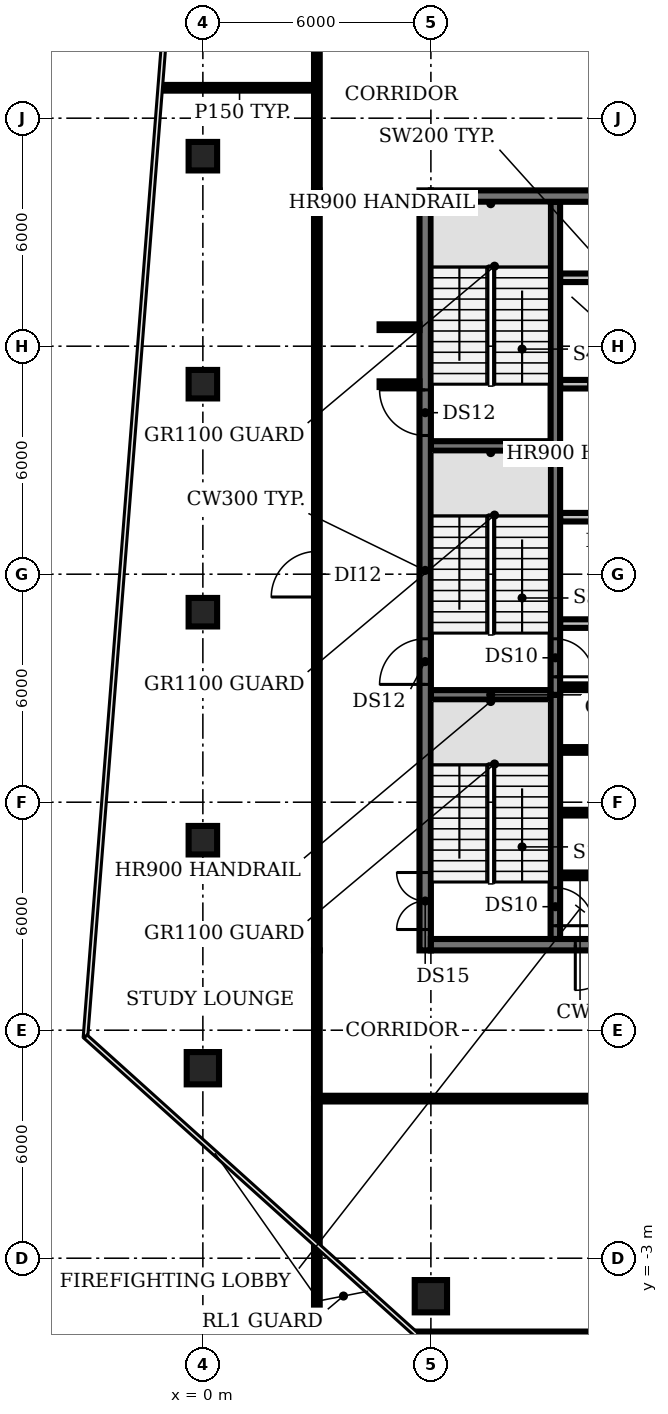
"""IFC4 building model, lengths in metres.
Left out: names, types, materials, properties, quantities, classifications, styles, units other than length and angle.
Written with IfcOpenShell. Run it as: python <this file> out.ifc"""

import sys

from ifc_helpers import new_model, si_unit, direction, frame, frame_2d, origin, origin_2d, place, context, subcontext, project, spatial, rectangle, circle, extrude, element, fill, save


model = new_model("IFC4")
c1 = context("Model", 3, precision=1e-05, world=origin(), true_north=direction((0.0, 1.0)))
c2 = subcontext(c1, "Body", "Model", "MODEL_VIEW")
j1 = project(units=[si_unit("LENGTHUNIT", "METRE"), si_unit("PLANEANGLEUNIT", "RADIAN")], contexts=[c1])
p1 = place(None, origin())
s1 = spatial("IfcSite", under=j1, at=p1, CompositionType="ELEMENT")
p2 = place(p1, origin())
s2 = spatial("IfcBuilding", under=s1, at=p2, CompositionType="ELEMENT")
p3 = place(p2, frame((0.0, 0.0, 268.4)))
s3 = spatial("IfcBuildingStorey", under=s2, at=p3, CompositionType="ELEMENT", Elevation=268.4)
p4 = place(p3, frame((0.0, 2.0, 0.0), z_axis=(0.0, 0.0, 1.0), x_axis=(1.0, 0.0, 0.0)))
e1 = element("IfcColumn", 1, at=p4, inside=s3, PredefinedType="COLUMN", context=c2, shape_type="SweptSolid", body=[
    extrude(circle(Radius=0.425, at=origin_2d()), origin(), (0.0, 0.0, 1.0), 3.8),
])
for number, where, z_axis, x_axis in (
    (2, (0.0, 8.0, 0.0), (0.0, 0.0, 1.0), (1.0, 0.0, 0.0)),
    (3, (0.0, 14.0, 0.0), (0.0, 0.0, 1.0), (1.0, 0.0, 0.0)),
    (4, (0.0, 20.0, 0.0), (0.0, 0.0, 1.0), (1.0, 0.0, 0.0)),
    (5, (0.0, 26.0, 0.0), (0.0, 0.0, 1.0), (1.0, 0.0, 0.0)),
):
    element("IfcColumn", number, at=place(p3, frame(where, z_axis=z_axis, x_axis=x_axis)), inside=s3, PredefinedType="COLUMN", context=c2, shape_type="SweptSolid", body=[
        extrude(rectangle(XDim=0.75, YDim=0.75, at=origin_2d()), origin(), (0.0, 0.0, 1.0), 3.8),
    ])
p5 = place(p3, frame((6.0, -4.0, 0.0), z_axis=(0.0, 0.0, 1.0), x_axis=(1.0, 0.0, 0.0)))
e6 = element("IfcColumn", 6, at=p5, inside=s3, PredefinedType="COLUMN", context=c2, shape_type="SweptSolid", body=[
    extrude(circle(Radius=0.425, at=origin_2d()), origin(), (0.0, 0.0, 1.0), 3.8),
])
p6 = place(p3, frame((5.64, -5.08, 0.0), z_axis=(0.0, 0.0, 1.0), x_axis=(1.0, 0.0, 0.0)))
e7 = element("IfcWall", 7, at=p6, inside=s3, PredefinedType="SOLIDWALL", context=c2, shape_type="SweptSolid", body=[
    extrude(rectangle(XDim=8.493, YDim=0.3, at=frame_2d((4.247, 0.0))), origin(), (0.0, 0.0, 1.0), 3.8),
])
for number, where, z_axis, x_axis in (
    (8, (9.4, 7.075, 0.0), (0.0, 0.0, 1.0), (1.0, 0.0, 0.0)),
    (9, (9.4, 8.725, 0.0), (0.0, 0.0, 1.0), (1.0, 0.0, 0.0)),
    (10, (9.4, 10.375, 0.0), (0.0, 0.0, 1.0), (1.0, 0.0, 0.0)),
):
    element("IfcWall", number, at=place(p3, frame(where, z_axis=z_axis, x_axis=x_axis)), inside=s3, PredefinedType="SHEAR", context=c2, shape_type="SweptSolid", body=[
        extrude(rectangle(XDim=1.05, YDim=0.15, at=frame_2d((0.525, 0.0))), origin(), (0.0, 0.0, 1.0), 3.8),
    ])
p7 = place(p3, frame((6.0, 11.825, 0.0), z_axis=(0.0, 0.0, 1.0), x_axis=(1.0, 0.0, 0.0)))
e11 = element("IfcWall", 11, at=p7, inside=s3, PredefinedType="SHEAR", context=c2, shape_type="SweptSolid", body=[
    extrude(rectangle(XDim=3.15, YDim=0.25, at=frame_2d((1.575, 0.0))), origin(), (0.0, 0.0, 1.0), 3.8),
])
p8 = place(p3, frame((9.4, 12.025, 0.0), z_axis=(0.0, 0.0, 1.0), x_axis=(1.0, 0.0, 0.0)))
e12 = element("IfcWall", 12, at=p8, inside=s3, PredefinedType="SHEAR", context=c2, shape_type="SweptSolid", body=[
    extrude(rectangle(XDim=1.05, YDim=0.15, at=frame_2d((0.525, 0.0))), origin(), (0.0, 0.0, 1.0), 3.8),
])
p9 = place(p3, frame((9.4, 13.7, 0.0), z_axis=(0.0, 0.0, 1.0), x_axis=(1.0, 0.0, 0.0)))
e13 = element("IfcWall", 13, at=p9, inside=s3, PredefinedType="PARTITIONING", context=c2, shape_type="SweptSolid", body=[
    extrude(rectangle(XDim=4.0, YDim=0.225, at=frame_2d((2.0, 0.0))), origin(), (0.0, 0.0, 1.0), 3.8),
])
p10 = place(p3, frame((9.4, 16.5, 0.0), z_axis=(0.0, 0.0, 1.0), x_axis=(1.0, 0.0, 0.0)))
e14 = element("IfcWall", 14, at=p10, inside=s3, PredefinedType="PARTITIONING", context=c2, shape_type="SweptSolid", body=[
    extrude(rectangle(XDim=14.6, YDim=0.225, at=frame_2d((7.3, 0.0))), origin(), (0.0, 0.0, 1.0), 3.8),
])
p11 = place(p10, frame((0.85, 0.0, 0.0)))
e15 = element("IfcOpeningElement", 15, at=p11, cuts=e14, PredefinedType="OPENING", context=c2, shape_type="SweptSolid", body=[
    extrude(rectangle(XDim=0.9, YDim=2.1, at=frame_2d((0.45, 1.05))), frame((0.0, 0.123, 0.0), z_axis=(0.0, -1.0, 0.0), x_axis=(1.0, 0.0, 0.0)), (0.0, 0.0, 1.0), 0.245),
])
p12 = place(p10, frame((3.625, 0.0, 0.0)))
e16 = element("IfcOpeningElement", 16, at=p12, cuts=e14, PredefinedType="OPENING", context=c2, shape_type="SweptSolid", body=[
    extrude(rectangle(XDim=0.9, YDim=2.1, at=frame_2d((0.45, 1.05))), frame((0.0, 0.123, 0.0), z_axis=(0.0, -1.0, 0.0), x_axis=(1.0, 0.0, 0.0)), (0.0, 0.0, 1.0), 0.245),
])
p13 = place(p10, frame((7.775, 0.0, 0.0)))
e17 = element("IfcOpeningElement", 17, at=p13, cuts=e14, PredefinedType="OPENING", context=c2, shape_type="SweptSolid", body=[
    extrude(rectangle(XDim=1.0, YDim=2.1, at=frame_2d((0.5, 1.05))), frame((0.0, 0.123, 0.0), z_axis=(0.0, -1.0, 0.0), x_axis=(1.0, 0.0, 0.0)), (0.0, 0.0, 1.0), 0.245),
])
p14 = place(p10, frame((11.308, 0.0, 0.0)))
e18 = element("IfcOpeningElement", 18, at=p14, cuts=e14, PredefinedType="OPENING", context=c2, shape_type="SweptSolid", body=[
    extrude(rectangle(XDim=0.9, YDim=2.1, at=frame_2d((0.45, 1.05))), frame((0.0, 0.123, 0.0), z_axis=(0.0, -1.0, 0.0), x_axis=(1.0, 0.0, 0.0)), (0.0, 0.0, 1.0), 0.245),
])
p15 = place(p10, frame((13.083, 0.0, 0.0)))
e19 = element("IfcOpeningElement", 19, at=p15, cuts=e14, PredefinedType="OPENING", context=c2, shape_type="SweptSolid", body=[
    extrude(rectangle(XDim=0.9, YDim=2.1, at=frame_2d((0.45, 1.05))), frame((0.0, 0.123, 0.0), z_axis=(0.0, -1.0, 0.0), x_axis=(1.0, 0.0, 0.0)), (0.0, 0.0, 1.0), 0.245),
])
p16 = place(p3, frame((6.0, 18.375, 0.0), z_axis=(0.0, 0.0, 1.0), x_axis=(1.0, 0.0, 0.0)))
e20 = element("IfcWall", 20, at=p16, inside=s3, PredefinedType="SHEAR", context=c2, shape_type="SweptSolid", body=[
    extrude(rectangle(XDim=3.15, YDim=0.25, at=frame_2d((1.575, 0.0))), origin(), (0.0, 0.0, 1.0), 3.8),
])
p17 = place(p3, frame((24.0, 20.0, 0.0), z_axis=(0.0, 0.0, 1.0), x_axis=(-1.0, 0.0, 0.0)))
e21 = element("IfcWall", 21, at=p17, inside=s3, PredefinedType="PARTITIONING", context=c2, shape_type="SweptSolid", body=[
    extrude(rectangle(XDim=14.6, YDim=0.225, at=frame_2d((7.3, 0.0))), origin(), (0.0, 0.0, 1.0), 3.8),
])
p18 = place(p17, frame((12.75, 0.0, 0.0)))
e22 = element("IfcOpeningElement", 22, at=p18, cuts=e21, PredefinedType="OPENING", context=c2, shape_type="SweptSolid", body=[
    extrude(rectangle(XDim=1.1, YDim=2.1, at=frame_2d((0.55, 1.05))), frame((0.0, 0.123, 0.0), z_axis=(0.0, -1.0, 0.0), x_axis=(1.0, 0.0, 0.0)), (0.0, 0.0, 1.0), 0.245),
])
p19 = place(p17, frame((9.95, 0.0, 0.0)))
e23 = element("IfcOpeningElement", 23, at=p19, cuts=e21, PredefinedType="OPENING", context=c2, shape_type="SweptSolid", body=[
    extrude(rectangle(XDim=1.1, YDim=2.1, at=frame_2d((0.55, 1.05))), frame((0.0, 0.123, 0.0), z_axis=(0.0, -1.0, 0.0), x_axis=(1.0, 0.0, 0.0)), (0.0, 0.0, 1.0), 0.245),
])
p20 = place(p17, frame((7.15, 0.0, 0.0)))
e24 = element("IfcOpeningElement", 24, at=p20, cuts=e21, PredefinedType="OPENING", context=c2, shape_type="SweptSolid", body=[
    extrude(rectangle(XDim=1.1, YDim=2.1, at=frame_2d((0.55, 1.05))), frame((0.0, 0.123, 0.0), z_axis=(0.0, -1.0, 0.0), x_axis=(1.0, 0.0, 0.0)), (0.0, 0.0, 1.0), 0.245),
])
p21 = place(p17, frame((4.35, 0.0, 0.0)))
e25 = element("IfcOpeningElement", 25, at=p21, cuts=e21, PredefinedType="OPENING", context=c2, shape_type="SweptSolid", body=[
    extrude(rectangle(XDim=1.1, YDim=2.1, at=frame_2d((0.55, 1.05))), frame((0.0, 0.123, 0.0), z_axis=(0.0, -1.0, 0.0), x_axis=(1.0, 0.0, 0.0)), (0.0, 0.0, 1.0), 0.245),
])
p22 = place(p17, frame((2.308, 0.0, 0.0)))
e26 = element("IfcOpeningElement", 26, at=p22, cuts=e21, PredefinedType="OPENING", context=c2, shape_type="SweptSolid", body=[
    extrude(rectangle(XDim=0.9, YDim=2.1, at=frame_2d((0.45, 1.05))), frame((0.0, 0.123, 0.0), z_axis=(0.0, -1.0, 0.0), x_axis=(1.0, 0.0, 0.0)), (0.0, 0.0, 1.0), 0.245),
])
p23 = place(p17, frame((0.633, 0.0, 0.0)))
e27 = element("IfcOpeningElement", 27, at=p23, cuts=e21, PredefinedType="OPENING", context=c2, shape_type="SweptSolid", body=[
    extrude(rectangle(XDim=0.9, YDim=2.1, at=frame_2d((0.45, 1.05))), frame((0.0, 0.123, 0.0), z_axis=(0.0, -1.0, 0.0), x_axis=(1.0, 0.0, 0.0)), (0.0, 0.0, 1.0), 0.245),
])
p24 = place(p3, frame((9.4, 22.8, 0.0), z_axis=(0.0, 0.0, 1.0), x_axis=(1.0, 0.0, 0.0)))
e28 = element("IfcWall", 28, at=p24, inside=s3, PredefinedType="PARTITIONING", context=c2, shape_type="SweptSolid", body=[
    extrude(rectangle(XDim=14.6, YDim=0.225, at=frame_2d((7.3, 0.0))), origin(), (0.0, 0.0, 1.0), 3.8),
])
p25 = place(p3, frame((9.275, 11.825, 0.0), z_axis=(0.0, 0.0, 1.0), x_axis=(0.0, -1.0, 0.0)))
e29 = element("IfcWall", 29, at=p25, inside=s3, PredefinedType="SHEAR", context=c2, shape_type="SweptSolid", body=[
    extrude(rectangle(XDim=6.425, YDim=0.25, at=frame_2d((3.212, 0.0))), origin(), (0.0, 0.0, 1.0), 3.8),
])
p26 = place(p25, frame((5.075, 0.0, 0.0)))
e30 = element("IfcOpeningElement", 30, at=p26, cuts=e29, PredefinedType="OPENING", context=c2, shape_type="SweptSolid", body=[
    extrude(rectangle(XDim=1.0, YDim=2.1, at=frame_2d((0.5, 1.05))), frame((0.0, 0.135, 0.0), z_axis=(0.0, -1.0, 0.0), x_axis=(1.0, 0.0, 0.0)), (0.0, 0.0, 1.0), 0.27),
])
p27 = place(p3, frame((9.275, 18.375, 0.0), z_axis=(0.0, 0.0, 1.0), x_axis=(0.0, -1.0, 0.0)))
e31 = element("IfcWall", 31, at=p27, inside=s3, PredefinedType="SHEAR", context=c2, shape_type="SweptSolid", body=[
    extrude(rectangle(XDim=6.55, YDim=0.25, at=frame_2d((3.275, 0.0))), origin(), (0.0, 0.0, 1.0), 3.8),
])
p28 = place(p27, frame((5.075, 0.0, 0.0)))
e32 = element("IfcOpeningElement", 32, at=p28, cuts=e31, PredefinedType="OPENING", context=c2, shape_type="SweptSolid", body=[
    extrude(rectangle(XDim=1.0, YDim=2.1, at=frame_2d((0.5, 1.05))), frame((0.0, 0.135, 0.0), z_axis=(0.0, -1.0, 0.0), x_axis=(1.0, 0.0, 0.0)), (0.0, 0.0, 1.0), 0.27),
])
p29 = place(p3, frame((9.275, 18.375, 0.0), z_axis=(0.0, 0.0, 1.0), x_axis=(0.0, 1.0, 0.0)))
e33 = element("IfcWall", 33, at=p29, inside=s3, PredefinedType="SHEAR", context=c2, shape_type="SweptSolid", body=[
    extrude(rectangle(XDim=6.425, YDim=0.25, at=frame_2d((3.212, 0.0))), origin(), (0.0, 0.0, 1.0), 3.8),
])
p30 = place(p3, frame((5.85, 5.1, 0.0), z_axis=(0.0, 0.0, 1.0), x_axis=(0.0, 1.0, 0.0)))
e34 = element("IfcWall", 34, at=p30, inside=s3, PredefinedType="SHEAR", context=c2, shape_type="SweptSolid", body=[
    extrude(rectangle(XDim=20.0, YDim=0.3, at=frame_2d((10.0, 0.0))), origin(), (0.0, 0.0, 1.0), 3.8),
])
p31 = place(p30, frame((0.55, 0.0, 0.0)))
e35 = element("IfcOpeningElement", 35, at=p31, cuts=e34, PredefinedType="OPENING", context=c2, shape_type="SweptSolid", body=[
    extrude(rectangle(XDim=1.5, YDim=2.1, at=frame_2d((0.75, 1.05))), frame((0.0, 0.16, 0.0), z_axis=(0.0, -1.0, 0.0), x_axis=(1.0, 0.0, 0.0)), (0.0, 0.0, 1.0), 0.32),
])
p32 = place(p30, frame((7.0, 0.0, 0.0)))
e36 = element("IfcOpeningElement", 36, at=p32, cuts=e34, PredefinedType="OPENING", context=c2, shape_type="SweptSolid", body=[
    extrude(rectangle(XDim=1.2, YDim=2.1, at=frame_2d((0.6, 1.05))), frame((0.0, 0.16, 0.0), z_axis=(0.0, -1.0, 0.0), x_axis=(1.0, 0.0, 0.0)), (0.0, 0.0, 1.0), 0.32),
])
p33 = place(p30, frame((13.55, 0.0, 0.0)))
e37 = element("IfcOpeningElement", 37, at=p33, cuts=e34, PredefinedType="OPENING", context=c2, shape_type="SweptSolid", body=[
    extrude(rectangle(XDim=1.2, YDim=2.1, at=frame_2d((0.6, 1.05))), frame((0.0, 0.16, 0.0), z_axis=(0.0, -1.0, 0.0), x_axis=(1.0, 0.0, 0.0)), (0.0, 0.0, 1.0), 0.32),
])
p34 = place(p3, frame((24.0, 5.25, 0.0), z_axis=(0.0, 0.0, 1.0), x_axis=(-1.0, 0.0, 0.0)))
e38 = element("IfcWall", 38, at=p34, inside=s3, PredefinedType="SHEAR", context=c2, shape_type="SweptSolid", body=[
    extrude(rectangle(XDim=18.0, YDim=0.3, at=frame_2d((9.0, 0.0))), origin(), (0.0, 0.0, 1.0), 3.8),
])
p35 = place(p34, frame((13.0, 0.0, 0.0)))
e39 = element("IfcOpeningElement", 39, at=p35, cuts=e38, PredefinedType="OPENING", context=c2, shape_type="SweptSolid", body=[
    extrude(rectangle(XDim=1.2, YDim=2.1, at=frame_2d((0.6, 1.05))), frame((0.0, 0.16, 0.0), z_axis=(0.0, -1.0, 0.0), x_axis=(1.0, 0.0, 0.0)), (0.0, 0.0, 1.0), 0.32),
])
p36 = place(p34, frame((4.9, 0.0, 0.0)))
e40 = element("IfcOpeningElement", 40, at=p36, cuts=e38, PredefinedType="OPENING", context=c2, shape_type="SweptSolid", body=[
    extrude(rectangle(XDim=1.0, YDim=2.1, at=frame_2d((0.5, 1.05))), frame((0.0, 0.16, 0.0), z_axis=(0.0, -1.0, 0.0), x_axis=(1.0, 0.0, 0.0)), (0.0, 0.0, 1.0), 0.32),
])
p37 = place(p3, frame((6.0, 24.95, 0.0), z_axis=(0.0, 0.0, 1.0), x_axis=(1.0, 0.0, 0.0)))
e41 = element("IfcWall", 41, at=p37, inside=s3, PredefinedType="SHEAR", context=c2, shape_type="SweptSolid", body=[
    extrude(rectangle(XDim=18.0, YDim=0.3, at=frame_2d((9.0, 0.0))), origin(), (0.0, 0.0, 1.0), 3.8),
])
p38 = place(p3, frame((-1.07, 27.8, 0.0), z_axis=(0.0, 0.0, 1.0), x_axis=(1.0, 0.0, 0.0)))
e42 = element("IfcWall", 42, at=p38, inside=s3, PredefinedType="PARTITIONING", context=c2, shape_type="SweptSolid", body=[
    extrude(rectangle(XDim=4.07, YDim=0.15, at=frame_2d((2.035, 0.0))), origin(), (0.0, 0.0, 1.0), 2.85),
])
p39 = place(p3, frame((3.0, -4.22, 0.0), z_axis=(0.0, 0.0, 1.0), x_axis=(0.0, 1.0, 0.0)))
e43 = element("IfcWall", 43, at=p39, inside=s3, PredefinedType="PARTITIONING", context=c2, shape_type="SweptSolid", body=[
    extrude(rectangle(XDim=5.42, YDim=0.15, at=frame_2d((2.71, 0.0))), origin(), (0.0, 0.0, 1.0), 2.85),
])
p40 = place(p3, frame((3.0, 1.2, 0.0), z_axis=(0.0, 0.0, 1.0), x_axis=(0.0, 1.0, 0.0)))
e44 = element("IfcWall", 44, at=p40, inside=s3, PredefinedType="PARTITIONING", context=c2, shape_type="SweptSolid", body=[
    extrude(rectangle(XDim=3.9, YDim=0.15, at=frame_2d((1.95, 0.0))), origin(), (0.0, 0.0, 1.0), 2.85),
])
p41 = place(p3, frame((3.0, 5.1, 0.0), z_axis=(0.0, 0.0, 1.0), x_axis=(0.0, 1.0, 0.0)))
e45 = element("IfcWall", 45, at=p41, inside=s3, PredefinedType="PARTITIONING", context=c2, shape_type="SweptSolid", body=[
    extrude(rectangle(XDim=20.0, YDim=0.15, at=frame_2d((10.0, 0.0))), origin(), (0.0, 0.0, 1.0), 2.85),
])
p42 = place(p41, frame((9.3, 0.0, 0.0)))
e46 = element("IfcOpeningElement", 46, at=p42, cuts=e45, PredefinedType="OPENING", context=c2, shape_type="SweptSolid", body=[
    extrude(rectangle(XDim=1.2, YDim=2.1, at=frame_2d((0.6, 1.05))), frame((0.0, 0.085, 0.0), z_axis=(0.0, -1.0, 0.0), x_axis=(1.0, 0.0, 0.0)), (0.0, 0.0, 1.0), 0.17),
])
p43 = place(p3, frame((3.0, 25.1, 0.0), z_axis=(0.0, 0.0, 1.0), x_axis=(0.0, 1.0, 0.0)))
e47 = element("IfcWall", 47, at=p43, inside=s3, PredefinedType="PARTITIONING", context=c2, shape_type="SweptSolid", body=[
    extrude(rectangle(XDim=3.9, YDim=0.15, at=frame_2d((1.95, 0.0))), origin(), (0.0, 0.0, 1.0), 2.85),
])
for number, where, z_axis, x_axis in (
    (48, (4.65, 20.0, 0.0), (0.0, 0.0, 1.0), (1.0, 0.0, 0.0)),
    (49, (4.65, 21.5, 0.0), (0.0, 0.0, 1.0), (1.0, 0.0, 0.0)),
):
    element("IfcWall", number, at=place(p3, frame(where, z_axis=z_axis, x_axis=x_axis)), inside=s3, PredefinedType="PARTITIONING", context=c2, shape_type="SweptSolid", body=[
        extrude(rectangle(XDim=1.05, YDim=0.15, at=frame_2d((0.525, 0.0))), origin(), (0.0, 0.0, 1.0), 2.85),
    ])
p44 = place(p3, frame((27.0, 1.2, 0.0), z_axis=(0.0, 0.0, 1.0), x_axis=(-1.0, 0.0, 0.0)))
e50 = element("IfcWall", 50, at=p44, inside=s3, PredefinedType="PARTITIONING", context=c2, shape_type="SweptSolid", body=[
    extrude(rectangle(XDim=24.0, YDim=0.15, at=frame_2d((12.0, 0.0))), origin(), (0.0, 0.0, 1.0), 2.85),
])
p45 = place(p44, frame((11.5, 0.0, 0.0)))
e51 = element("IfcOpeningElement", 51, at=p45, cuts=e50, PredefinedType="OPENING", context=c2, shape_type="SweptSolid", body=[
    extrude(rectangle(XDim=1.2, YDim=2.1, at=frame_2d((0.6, 1.05))), frame((0.0, 0.085, 0.0), z_axis=(0.0, -1.0, 0.0), x_axis=(1.0, 0.0, 0.0)), (0.0, 0.0, 1.0), 0.17),
])
p46 = place(p26, origin())
e52 = element("IfcDoor", 52, at=p46, inside=s3, OperationType="SINGLE_SWING_RIGHT", PredefinedType="DOOR", context=c2, shape_type="SweptSolid", body=[
    extrude(rectangle(XDim=1.0, YDim=2.1, at=frame_2d((0.5, 1.05))), frame((0.0, 0.025, 0.0), z_axis=(0.0, -1.0, 0.0), x_axis=(1.0, 0.0, 0.0)), (0.0, 0.0, 1.0), 0.05),
])
fill(e30, e52)
p47 = place(p28, origin())
e53 = element("IfcDoor", 53, at=p47, inside=s3, OperationType="SINGLE_SWING_RIGHT", PredefinedType="DOOR", context=c2, shape_type="SweptSolid", body=[
    extrude(rectangle(XDim=1.0, YDim=2.1, at=frame_2d((0.5, 1.05))), frame((0.0, 0.025, 0.0), z_axis=(0.0, -1.0, 0.0), x_axis=(1.0, 0.0, 0.0)), (0.0, 0.0, 1.0), 0.05),
])
fill(e32, e53)
p48 = place(p31, origin())
e54 = element("IfcDoor", 54, at=p48, inside=s3, OperationType="DOUBLE_DOOR_SINGLE_SWING", PredefinedType="DOOR", context=c2, shape_type="SweptSolid", body=[
    extrude(rectangle(XDim=1.5, YDim=2.1, at=frame_2d((0.75, 1.05))), frame((0.0, 0.025, 0.0), z_axis=(0.0, -1.0, 0.0), x_axis=(1.0, 0.0, 0.0)), (0.0, 0.0, 1.0), 0.05),
])
fill(e35, e54)
p49 = place(p32, origin())
e55 = element("IfcDoor", 55, at=p49, inside=s3, OperationType="SINGLE_SWING_LEFT", PredefinedType="DOOR", context=c2, shape_type="SweptSolid", body=[
    extrude(rectangle(XDim=1.2, YDim=2.1, at=frame_2d((0.6, 1.05))), frame((0.0, 0.025, 0.0), z_axis=(0.0, -1.0, 0.0), x_axis=(1.0, 0.0, 0.0)), (0.0, 0.0, 1.0), 0.05),
])
fill(e36, e55)
p50 = place(p33, origin())
e56 = element("IfcDoor", 56, at=p50, inside=s3, OperationType="SINGLE_SWING_RIGHT", PredefinedType="DOOR", context=c2, shape_type="SweptSolid", body=[
    extrude(rectangle(XDim=1.2, YDim=2.1, at=frame_2d((0.6, 1.05))), frame((0.0, 0.025, 0.0), z_axis=(0.0, -1.0, 0.0), x_axis=(1.0, 0.0, 0.0)), (0.0, 0.0, 1.0), 0.05),
])
fill(e37, e56)
p51 = place(p35, origin())
e57 = element("IfcDoor", 57, at=p51, inside=s3, OperationType="SINGLE_SWING_RIGHT", PredefinedType="DOOR", context=c2, shape_type="SweptSolid", body=[
    extrude(rectangle(XDim=1.2, YDim=2.1, at=frame_2d((0.6, 1.05))), frame((0.0, 0.025, 0.0), z_axis=(0.0, -1.0, 0.0), x_axis=(1.0, 0.0, 0.0)), (0.0, 0.0, 1.0), 0.05),
])
fill(e39, e57)
p52 = place(p42, origin())
e58 = element("IfcDoor", 58, at=p52, inside=s3, OperationType="SINGLE_SWING_LEFT", PredefinedType="DOOR", context=c2, shape_type="SweptSolid", body=[
    extrude(rectangle(XDim=1.2, YDim=2.1, at=frame_2d((0.6, 1.05))), frame((0.0, 0.025, 0.0), z_axis=(0.0, -1.0, 0.0), x_axis=(1.0, 0.0, 0.0)), (0.0, 0.0, 1.0), 0.05),
])
fill(e46, e58)
save(model, sys.argv[1])
